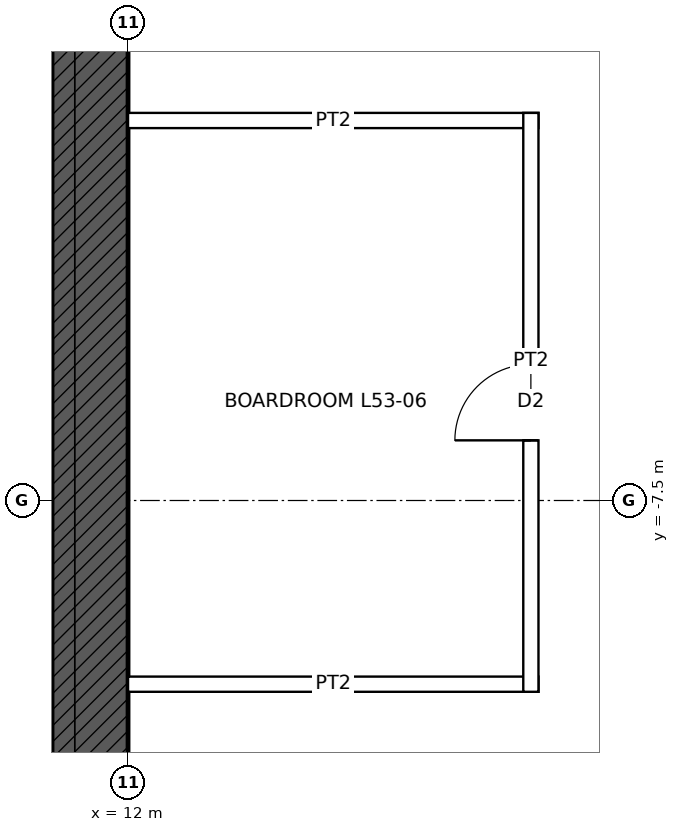
"""IFC4 building model, lengths in metres.
Left out: names, types, materials, properties, quantities, classifications, styles, units other than length and angle.
Written with IfcOpenShell. Run it as: python <this file> out.ifc"""

import sys

from ifc_helpers import new_model, si_unit, direction, frame, frame_2d, origin, place, context, subcontext, project, spatial, rectangle, extrude, element, fill, save


model = new_model("IFC4")
c1 = context("Model", 3, precision=1e-05, world=origin(), true_north=direction((0.0, 1.0)))
c2 = subcontext(c1, "Body", "Model", "MODEL_VIEW")
j1 = project(units=[si_unit("LENGTHUNIT", "METRE"), si_unit("PLANEANGLEUNIT", "RADIAN")], contexts=[c1])
p1 = place(None, origin())
s1 = spatial("IfcSite", under=j1, at=p1, CompositionType="ELEMENT")
p2 = place(p1, origin())
s2 = spatial("IfcBuilding", under=s1, at=p2, CompositionType="ELEMENT")
p3 = place(p2, frame((0.0, 0.0, 245.9)))
s3 = spatial("IfcBuildingStorey", under=s2, at=p3, CompositionType="ELEMENT", Elevation=245.9)
p4 = place(p3, frame((11.5, 11.0, 0.0), z_axis=(0.0, 0.0, 1.0), x_axis=(0.0, -1.0, 0.0)))
e1 = element("IfcWall", 1, at=p4, inside=s3, PredefinedType="SHEAR", context=c2, shape_type="SweptSolid", body=[
    extrude(rectangle(XDim=22.0, YDim=1.0, at=frame_2d((11.0, 0.0))), origin(), (0.0, 0.0, 1.0), 4.0),
])
p5 = place(p4, frame((10.5, 0.0, 0.0)))
e2 = element("IfcOpeningElement", 2, at=p5, cuts=e1, PredefinedType="OPENING", context=c2, shape_type="SweptSolid", body=[
    extrude(rectangle(XDim=1.0, YDim=2.4, at=frame_2d((0.5, 1.2))), frame((0.0, 0.51, 0.0), z_axis=(0.0, -1.0, 0.0), x_axis=(1.0, 0.0, 0.0)), (0.0, 0.0, 1.0), 1.02),
])
for number, where, z_axis, x_axis in (
    (3, (12.0, -9.917, 0.0), (0.0, 0.0, 1.0), (1.0, 0.0, 0.0)),
    (4, (12.0, -2.5, 0.0), (0.0, 0.0, 1.0), (1.0, 0.0, 0.0)),
):
    element("IfcWall", number, at=place(p3, frame(where, z_axis=z_axis, x_axis=x_axis)), inside=s3, PredefinedType="PARTITIONING", context=c2, shape_type="SweptSolid", body=[
        extrude(rectangle(XDim=5.4, YDim=0.2, at=frame_2d((2.7, 0.0))), origin(), (0.0, 0.0, 1.0), 3.85),
    ])
p6 = place(p3, frame((17.3, -10.017, 0.0), z_axis=(0.0, 0.0, 1.0), x_axis=(0.0, 1.0, 0.0)))
e5 = element("IfcWall", 5, at=p6, inside=s3, PredefinedType="PARTITIONING", context=c2, shape_type="SweptSolid", body=[
    extrude(rectangle(XDim=7.617, YDim=0.2, at=frame_2d((3.809, 0.0))), origin(), (0.0, 0.0, 1.0), 3.85),
])
p7 = place(p6, frame((3.309, 0.0, 0.0)))
e6 = element("IfcOpeningElement", 6, at=p7, cuts=e5, PredefinedType="OPENING", context=c2, shape_type="SweptSolid", body=[
    extrude(rectangle(XDim=1.0, YDim=2.1, at=frame_2d((0.5, 1.05))), frame((0.0, 0.11, 0.0), z_axis=(0.0, -1.0, 0.0), x_axis=(1.0, 0.0, 0.0)), (0.0, 0.0, 1.0), 0.22),
])
p8 = place(p7, origin())
e7 = element("IfcDoor", 7, at=p8, inside=s3, OperationType="SINGLE_SWING_LEFT", PredefinedType="DOOR", context=c2, shape_type="SweptSolid", body=[
    extrude(rectangle(XDim=1.0, YDim=2.1, at=frame_2d((0.5, 1.05))), frame((0.0, 0.025, 0.0), z_axis=(0.0, -1.0, 0.0), x_axis=(1.0, 0.0, 0.0)), (0.0, 0.0, 1.0), 0.05),
])
fill(e6, e7)
save(model, sys.argv[1])
